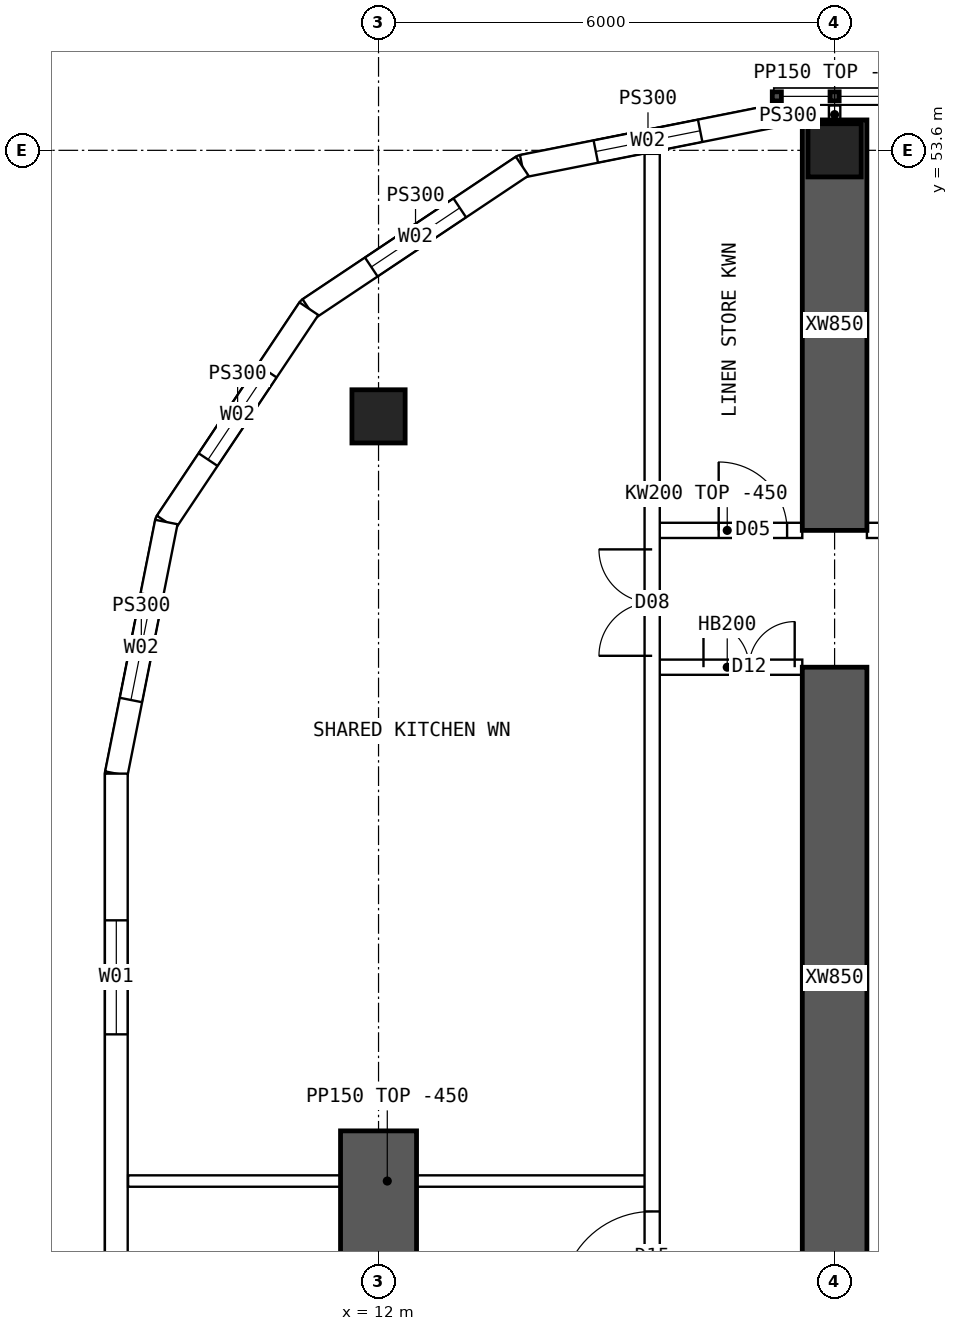
"""IFC4 building model, lengths in metres.
Left out: names, types, materials, properties, quantities, classifications, styles, units other than length and angle.
Written with IfcOpenShell. Run it as: python <this file> out.ifc"""

import sys

from ifc_helpers import new_model, si_unit, direction, frame, frame_2d, origin, origin_2d, place, context, subcontext, project, spatial, polyline, rectangle, hollow_rectangle, outline, extrude, element, fill, save


model = new_model("IFC4")
c1 = context("Model", 3, precision=1e-05, world=origin(), true_north=direction((0.0, 1.0)))
c2 = subcontext(c1, "Body", "Model", "MODEL_VIEW")
j1 = project(units=[si_unit("LENGTHUNIT", "METRE"), si_unit("PLANEANGLEUNIT", "RADIAN")], contexts=[c1])
p1 = place(None, origin())
s1 = spatial("IfcSite", under=j1, at=p1, CompositionType="ELEMENT")
p2 = place(p1, origin())
s2 = spatial("IfcBuilding", under=s1, at=p2, CompositionType="ELEMENT")
p3 = place(p2, frame((0.0, 0.0, 159.85)))
s3 = spatial("IfcBuildingStorey", under=s2, at=p3, CompositionType="ELEMENT", Elevation=159.85)
for number, where, z_axis, x_axis in (
    (1, (18.0, 53.6, 0.0), (0.0, 0.0, 1.0), (1.0, 0.0, 0.0)),
    (2, (12.0, 50.1, 0.0), (0.0, 0.0, 1.0), (1.0, 0.0, 0.0)),
):
    element("IfcColumn", number, at=place(p3, frame(where, z_axis=z_axis, x_axis=x_axis)), inside=s3, PredefinedType="COLUMN", context=c2, shape_type="SweptSolid", body=[
        extrude(hollow_rectangle(XDim=0.7, YDim=0.7, WallThickness=0.07, at=origin_2d()), origin(), (0.0, 0.0, 1.0), 3.75),
    ])
p4 = place(p3, frame((12.0, 35.7, 0.0), z_axis=(0.0, 0.0, 1.0), x_axis=(0.0, 1.0, 0.0)))
e3 = element("IfcWall", 3, at=p4, inside=s3, PredefinedType="SHEAR", context=c2, shape_type="SweptSolid", body=[
    extrude(rectangle(XDim=5.0, YDim=1.0, at=frame_2d((2.5, 0.0))), origin(), (0.0, 0.0, 1.0), 3.75),
])
p5 = place(p3, frame((18.0, 48.6, 0.0), z_axis=(0.0, 0.0, 1.0), x_axis=(0.0, 1.0, 0.0)))
e4 = element("IfcWall", 4, at=p5, inside=s3, PredefinedType="SHEAR", context=c2, shape_type="SweptSolid", body=[
    extrude(rectangle(XDim=5.4, YDim=0.85, at=frame_2d((2.7, 0.0))), origin(), (0.0, 0.0, 1.0), 3.75),
])
p6 = place(p3, frame((18.0, 38.625, 0.0), z_axis=(0.0, 0.0, 1.0), x_axis=(0.0, 1.0, 0.0)))
e5 = element("IfcWall", 5, at=p6, inside=s3, PredefinedType="SHEAR", context=c2, shape_type="SweptSolid", body=[
    extrude(rectangle(XDim=8.175, YDim=0.85, at=frame_2d((4.087, 0.0))), origin(), (0.0, 0.0, 1.0), 3.75),
])
p7 = place(p3, frame((8.55, 45.4, 0.0), z_axis=(0.0, 0.0, 1.0), x_axis=(0.0, -1.0, 0.0)))
e6 = element("IfcWall", 6, at=p7, inside=s3, PredefinedType="SOLIDWALL", context=c2, shape_type="SweptSolid", body=[
    extrude(outline(polyline([(-0.015, -0.15), (26.815, -0.15), (26.785, 0.15), (0.015, 0.15), (-0.015, -0.15)])), origin(), (0.0, 0.0, 1.0), 3.3),
])
p8 = place(p7, frame((1.93, 0.0, 0.9)))
e7 = element("IfcOpeningElement", 7, at=p8, cuts=e6, PredefinedType="OPENING", context=c2, shape_type="SweptSolid", body=[
    extrude(rectangle(XDim=1.5, YDim=2.0, at=frame_2d((0.75, 1.0))), frame((0.0, 0.16, 0.0), z_axis=(0.0, -1.0, 0.0), x_axis=(1.0, 0.0, 0.0)), (0.0, 0.0, 1.0), 0.32),
])
p9 = place(p7, frame((7.29, 0.0, 0.9)))
e8 = element("IfcOpeningElement", 8, at=p9, cuts=e6, PredefinedType="OPENING", context=c2, shape_type="SweptSolid", body=[
    extrude(rectangle(XDim=1.5, YDim=2.0, at=frame_2d((0.75, 1.0))), frame((0.0, 0.16, 0.0), z_axis=(0.0, -1.0, 0.0), x_axis=(1.0, 0.0, 0.0)), (0.0, 0.0, 1.0), 0.32),
])
p10 = place(p7, frame((12.65, 0.0, 0.9)))
e9 = element("IfcOpeningElement", 9, at=p10, cuts=e6, PredefinedType="OPENING", context=c2, shape_type="SweptSolid", body=[
    extrude(rectangle(XDim=1.5, YDim=2.0, at=frame_2d((0.75, 1.0))), frame((0.0, 0.16, 0.0), z_axis=(0.0, -1.0, 0.0), x_axis=(1.0, 0.0, 0.0)), (0.0, 0.0, 1.0), 0.32),
])
p11 = place(p7, frame((18.01, 0.0, 0.9)))
e10 = element("IfcOpeningElement", 10, at=p11, cuts=e6, PredefinedType="OPENING", context=c2, shape_type="SweptSolid", body=[
    extrude(rectangle(XDim=1.5, YDim=2.0, at=frame_2d((0.75, 1.0))), frame((0.0, 0.16, 0.0), z_axis=(0.0, -1.0, 0.0), x_axis=(1.0, 0.0, 0.0)), (0.0, 0.0, 1.0), 0.32),
])
p12 = place(p7, frame((23.37, 0.0, 0.9)))
e11 = element("IfcOpeningElement", 11, at=p12, cuts=e6, PredefinedType="OPENING", context=c2, shape_type="SweptSolid", body=[
    extrude(rectangle(XDim=1.5, YDim=2.0, at=frame_2d((0.75, 1.0))), frame((0.0, 0.16, 0.0), z_axis=(0.0, -1.0, 0.0), x_axis=(1.0, 0.0, 0.0)), (0.0, 0.0, 1.0), 0.32),
])
p13 = place(p3, frame((17.2, 54.05, 0.0), z_axis=(0.0, 0.0, 1.0), x_axis=(-0.98078325777, -0.195100490205, 0.0)))
e12 = element("IfcWall", 12, at=p13, inside=s3, PredefinedType="SOLIDWALL", context=c2, shape_type="SweptSolid", body=[
    extrude(outline(polyline([(-0.03, -0.15), (3.405, -0.15), (3.345, 0.15), (0.03, 0.15), (-0.03, -0.15)])), origin(), (0.0, 0.0, 1.0), 3.3),
])
p14 = place(p13, frame((0.988, 0.0, 0.9)))
e13 = element("IfcOpeningElement", 13, at=p14, cuts=e12, PredefinedType="OPENING", context=c2, shape_type="SweptSolid", body=[
    extrude(rectangle(XDim=1.4, YDim=1.8, at=frame_2d((0.7, 0.9))), frame((0.0, 0.16, 0.0), z_axis=(0.0, -1.0, 0.0), x_axis=(1.0, 0.0, 0.0)), (0.0, 0.0, 1.0), 0.32),
])
p15 = place(p3, frame((13.89, 53.392, 0.0), z_axis=(0.0, 0.0, 1.0), x_axis=(-0.831493450887, -0.555534554399, 0.0)))
e14 = element("IfcWall", 14, at=p15, inside=s3, PredefinedType="SOLIDWALL", context=c2, shape_type="SweptSolid", body=[
    extrude(outline(polyline([(-0.03, -0.15), (3.405, -0.15), (3.345, 0.15), (0.03, 0.15), (-0.03, -0.15)])), origin(), (0.0, 0.0, 1.0), 3.3),
])
p16 = place(p15, frame((0.988, 0.0, 0.9)))
e15 = element("IfcOpeningElement", 15, at=p16, cuts=e14, PredefinedType="OPENING", context=c2, shape_type="SweptSolid", body=[
    extrude(rectangle(XDim=1.4, YDim=1.8, at=frame_2d((0.7, 0.9))), frame((0.0, 0.16, 0.0), z_axis=(0.0, -1.0, 0.0), x_axis=(1.0, 0.0, 0.0)), (0.0, 0.0, 1.0), 0.32),
])
p17 = place(p3, frame((11.083, 51.517, 0.0), z_axis=(0.0, 0.0, 1.0), x_axis=(-0.555534554399, -0.831493450887, 0.0)))
e16 = element("IfcWall", 16, at=p17, inside=s3, PredefinedType="SOLIDWALL", context=c2, shape_type="SweptSolid", body=[
    extrude(outline(polyline([(-0.03, -0.15), (3.405, -0.15), (3.345, 0.15), (0.03, 0.15), (-0.03, -0.15)])), origin(), (0.0, 0.0, 1.0), 3.3),
])
p18 = place(p17, frame((0.988, 0.0, 0.9)))
e17 = element("IfcOpeningElement", 17, at=p18, cuts=e16, PredefinedType="OPENING", context=c2, shape_type="SweptSolid", body=[
    extrude(rectangle(XDim=1.4, YDim=1.8, at=frame_2d((0.7, 0.9))), frame((0.0, 0.16, 0.0), z_axis=(0.0, -1.0, 0.0), x_axis=(1.0, 0.0, 0.0)), (0.0, 0.0, 1.0), 0.32),
])
p19 = place(p3, frame((9.208, 48.71, 0.0), z_axis=(0.0, 0.0, 1.0), x_axis=(-0.19508664885, -0.980786011034, 0.0)))
e18 = element("IfcWall", 18, at=p19, inside=s3, PredefinedType="SOLIDWALL", context=c2, shape_type="SweptSolid", body=[
    extrude(outline(polyline([(-0.03, -0.15), (3.39, -0.15), (3.36, 0.15), (0.03, 0.15), (-0.03, -0.15)])), origin(), (0.0, 0.0, 1.0), 3.3),
])
p20 = place(p19, frame((0.988, 0.0, 0.9)))
e19 = element("IfcOpeningElement", 19, at=p20, cuts=e18, PredefinedType="OPENING", context=c2, shape_type="SweptSolid", body=[
    extrude(rectangle(XDim=1.4, YDim=1.8, at=frame_2d((0.7, 0.9))), frame((0.0, 0.16, 0.0), z_axis=(0.0, -1.0, 0.0), x_axis=(1.0, 0.0, 0.0)), (0.0, 0.0, 1.0), 0.32),
])
p21 = place(p3, frame((17.2, 54.05, 0.0), z_axis=(0.0, 0.0, 1.0), x_axis=(1.0, 0.0, 0.0)))
e20 = element("IfcWall", 20, at=p21, inside=s3, PredefinedType="SOLIDWALL", context=c2, shape_type="SweptSolid", body=[
    extrude(rectangle(XDim=0.375, YDim=0.3, at=frame_2d((0.188, 0.0))), origin(), (0.0, 0.0, 1.0), 3.3),
])
p22 = place(p3, frame((15.6, 48.6, 0.0), z_axis=(0.0, 0.0, 1.0), x_axis=(1.0, 0.0, 0.0)))
e21 = element("IfcWall", 21, at=p22, inside=s3, PredefinedType="SOLIDWALL", context=c2, shape_type="SweptSolid", body=[
    extrude(rectangle(XDim=1.975, YDim=0.2, at=frame_2d((0.987, 0.0))), origin(), (0.0, 0.0, 1.0), 3.3),
])
p23 = place(p22, frame((0.875, 0.0, 0.0)))
e22 = element("IfcOpeningElement", 22, at=p23, cuts=e21, PredefinedType="OPENING", context=c2, shape_type="SweptSolid", body=[
    extrude(rectangle(XDim=0.9, YDim=2.1, at=frame_2d((0.45, 1.05))), frame((0.0, 0.11, 0.0), z_axis=(0.0, -1.0, 0.0), x_axis=(1.0, 0.0, 0.0)), (0.0, 0.0, 1.0), 0.22),
])
p24 = place(p3, frame((15.6, 46.8, 0.0), z_axis=(0.0, 0.0, 1.0), x_axis=(1.0, 0.0, 0.0)))
e23 = element("IfcWall", 23, at=p24, inside=s3, PredefinedType="SOLIDWALL", context=c2, shape_type="SweptSolid", body=[
    extrude(rectangle(XDim=1.975, YDim=0.2, at=frame_2d((0.987, 0.0))), origin(), (0.0, 0.0, 1.0), 3.3),
])
p25 = place(p24, frame((0.675, 0.0, 0.0)))
e24 = element("IfcOpeningElement", 24, at=p25, cuts=e23, PredefinedType="OPENING", context=c2, shape_type="SweptSolid", body=[
    extrude(rectangle(XDim=1.2, YDim=2.1, at=frame_2d((0.6, 1.05))), frame((0.0, 0.11, 0.0), z_axis=(0.0, -1.0, 0.0), x_axis=(1.0, 0.0, 0.0)), (0.0, 0.0, 1.0), 0.22),
])
p26 = place(p3, frame((18.425, 48.6, 0.0), z_axis=(0.0, 0.0, 1.0), x_axis=(1.0, 0.0, 0.0)))
e25 = element("IfcWall", 25, at=p26, inside=s3, PredefinedType="SOLIDWALL", context=c2, shape_type="SweptSolid", body=[
    extrude(outline(polyline([(0.0, 0.0), (5.15, 0.0), (5.15, 2.9), (0.0, 2.9), (0.0, 0.0)])), frame((0.0, 0.1, 0.0), z_axis=(0.0, -1.0, 0.0), x_axis=(1.0, 0.0, 0.0)), (0.0, 0.0, 1.0), 0.2),
])
p27 = place(p26, frame((0.6, 0.0, 0.0)))
e26 = element("IfcOpeningElement", 26, at=p27, cuts=e25, PredefinedType="OPENING", context=c2, shape_type="SweptSolid", body=[
    extrude(rectangle(XDim=1.0, YDim=2.1, at=frame_2d((0.5, 1.05))), frame((0.0, 0.11, 0.0), z_axis=(0.0, -1.0, 0.0), x_axis=(1.0, 0.0, 0.0)), (0.0, 0.0, 1.0), 0.22),
])
p28 = place(p3, frame((15.6, 10.446, 0.0), z_axis=(0.0, 0.0, 1.0), x_axis=(0.0, 1.0, 0.0)))
e27 = element("IfcWall", 27, at=p28, inside=s3, PredefinedType="SOLIDWALL", context=c2, shape_type="SweptSolid", body=[
    extrude(rectangle(XDim=43.107, YDim=0.2, at=frame_2d((21.554, 0.0))), origin(), (0.0, 0.0, 1.0), 3.3),
])
p29 = place(p28, frame((13.914, 0.0, 0.0)))
e28 = element("IfcOpeningElement", 28, at=p29, cuts=e27, PredefinedType="OPENING", context=c2, shape_type="SweptSolid", body=[
    extrude(rectangle(XDim=1.2, YDim=2.1, at=frame_2d((0.6, 1.05))), frame((0.0, 0.11, 0.0), z_axis=(0.0, -1.0, 0.0), x_axis=(1.0, 0.0, 0.0)), (0.0, 0.0, 1.0), 0.22),
])
p30 = place(p28, frame((27.994, 0.0, 0.0)))
e29 = element("IfcOpeningElement", 29, at=p30, cuts=e27, PredefinedType="OPENING", context=c2, shape_type="SweptSolid", body=[
    extrude(rectangle(XDim=1.2, YDim=2.1, at=frame_2d((0.6, 1.05))), frame((0.0, 0.11, 0.0), z_axis=(0.0, -1.0, 0.0), x_axis=(1.0, 0.0, 0.0)), (0.0, 0.0, 1.0), 0.22),
])
p31 = place(p28, frame((5.104, 0.0, 0.0)))
e30 = element("IfcOpeningElement", 30, at=p31, cuts=e27, PredefinedType="OPENING", context=c2, shape_type="SweptSolid", body=[
    extrude(rectangle(XDim=1.4, YDim=2.1, at=frame_2d((0.7, 1.05))), frame((0.0, 0.11, 0.0), z_axis=(0.0, -1.0, 0.0), x_axis=(1.0, 0.0, 0.0)), (0.0, 0.0, 1.0), 0.22),
])
p32 = place(p28, frame((36.504, 0.0, 0.0)))
e31 = element("IfcOpeningElement", 31, at=p32, cuts=e27, PredefinedType="OPENING", context=c2, shape_type="SweptSolid", body=[
    extrude(rectangle(XDim=1.4, YDim=2.1, at=frame_2d((0.7, 1.05))), frame((0.0, 0.11, 0.0), z_axis=(0.0, -1.0, 0.0), x_axis=(1.0, 0.0, 0.0)), (0.0, 0.0, 1.0), 0.22),
])
p33 = place(p3, frame((8.705, 40.04, 0.0), z_axis=(0.0, 0.0, 1.0), x_axis=(1.0, 0.0, 0.0)))
e32 = element("IfcWall", 32, at=p33, inside=s3, PredefinedType="PARTITIONING", context=c2, shape_type="SweptSolid", body=[
    extrude(rectangle(XDim=6.82, YDim=0.15, at=frame_2d((3.41, 0.0))), origin(), (0.0, 0.0, 1.0), 3.3),
])
p34 = place(p3, frame((18.0, 53.95, 0.0), z_axis=(0.0, 0.0, 1.0), x_axis=(0.0, 1.0, 0.0)))
e33 = element("IfcWall", 33, at=p34, inside=s3, PredefinedType="PARTITIONING", context=c2, shape_type="SweptSolid", body=[
    extrude(rectangle(XDim=0.24, YDim=0.15, at=frame_2d((0.12, 0.0))), origin(), (0.0, 0.0, 1.0), 3.3),
])
p35 = place(p8, origin())
e34 = element("IfcWindow", 34, at=p35, inside=s3, PartitioningType="SINGLE_PANEL", PredefinedType="WINDOW", context=c2, shape_type="SweptSolid", body=[
    extrude(rectangle(XDim=1.5, YDim=2.0, at=frame_2d((0.75, 1.0))), frame((0.0, 0.03, 0.0), z_axis=(0.0, -1.0, 0.0), x_axis=(1.0, 0.0, 0.0)), (0.0, 0.0, 1.0), 0.06),
])
fill(e7, e34)
p36 = place(p14, origin())
e35 = element("IfcWindow", 35, at=p36, inside=s3, PartitioningType="SINGLE_PANEL", PredefinedType="WINDOW", context=c2, shape_type="SweptSolid", body=[
    extrude(rectangle(XDim=1.4, YDim=1.8, at=frame_2d((0.7, 0.9))), frame((0.0, 0.03, 0.0), z_axis=(0.0, -1.0, 0.0), x_axis=(1.0, 0.0, 0.0)), (0.0, 0.0, 1.0), 0.06),
])
fill(e13, e35)
p37 = place(p16, origin())
e36 = element("IfcWindow", 36, at=p37, inside=s3, PartitioningType="SINGLE_PANEL", PredefinedType="WINDOW", context=c2, shape_type="SweptSolid", body=[
    extrude(rectangle(XDim=1.4, YDim=1.8, at=frame_2d((0.7, 0.9))), frame((0.0, 0.03, 0.0), z_axis=(0.0, -1.0, 0.0), x_axis=(1.0, 0.0, 0.0)), (0.0, 0.0, 1.0), 0.06),
])
fill(e15, e36)
p38 = place(p18, origin())
e37 = element("IfcWindow", 37, at=p38, inside=s3, PartitioningType="SINGLE_PANEL", PredefinedType="WINDOW", context=c2, shape_type="SweptSolid", body=[
    extrude(rectangle(XDim=1.4, YDim=1.8, at=frame_2d((0.7, 0.9))), frame((0.0, 0.03, 0.0), z_axis=(0.0, -1.0, 0.0), x_axis=(1.0, 0.0, 0.0)), (0.0, 0.0, 1.0), 0.06),
])
fill(e17, e37)
p39 = place(p20, origin())
e38 = element("IfcWindow", 38, at=p39, inside=s3, PartitioningType="SINGLE_PANEL", PredefinedType="WINDOW", context=c2, shape_type="SweptSolid", body=[
    extrude(rectangle(XDim=1.4, YDim=1.8, at=frame_2d((0.7, 0.9))), frame((0.0, 0.03, 0.0), z_axis=(0.0, -1.0, 0.0), x_axis=(1.0, 0.0, 0.0)), (0.0, 0.0, 1.0), 0.06),
])
fill(e19, e38)
p40 = place(p25, origin())
e39 = element("IfcDoor", 39, at=p40, inside=s3, OperationType="DOUBLE_DOOR_SINGLE_SWING", PredefinedType="DOOR", context=c2, shape_type="SweptSolid", body=[
    extrude(rectangle(XDim=1.2, YDim=2.1, at=frame_2d((0.6, 1.05))), frame((0.0, 0.025, 0.0), z_axis=(0.0, -1.0, 0.0), x_axis=(1.0, 0.0, 0.0)), (0.0, 0.0, 1.0), 0.05),
])
fill(e24, e39)
p41 = place(p30, origin())
e40 = element("IfcDoor", 40, at=p41, inside=s3, OperationType="SINGLE_SWING_LEFT", PredefinedType="DOOR", context=c2, shape_type="SweptSolid", body=[
    extrude(rectangle(XDim=1.2, YDim=2.1, at=frame_2d((0.6, 1.05))), frame((0.0, 0.025, 0.0), z_axis=(0.0, -1.0, 0.0), x_axis=(1.0, 0.0, 0.0)), (0.0, 0.0, 1.0), 0.05),
])
fill(e29, e40)
p42 = place(p32, origin())
e41 = element("IfcDoor", 41, at=p42, inside=s3, OperationType="DOUBLE_DOOR_SINGLE_SWING", PredefinedType="DOOR", context=c2, shape_type="SweptSolid", body=[
    extrude(rectangle(XDim=1.4, YDim=2.1, at=frame_2d((0.7, 1.05))), frame((0.0, 0.025, 0.0), z_axis=(0.0, -1.0, 0.0), x_axis=(1.0, 0.0, 0.0)), (0.0, 0.0, 1.0), 0.05),
])
fill(e31, e41)
p43 = place(p23, origin())
e42 = element("IfcDoor", 42, at=p43, inside=s3, OperationType="SINGLE_SWING_LEFT", PredefinedType="DOOR", context=c2, shape_type="SweptSolid", body=[
    extrude(rectangle(XDim=0.9, YDim=2.1, at=frame_2d((0.45, 1.05))), frame((0.0, 0.025, 0.0), z_axis=(0.0, -1.0, 0.0), x_axis=(1.0, 0.0, 0.0)), (0.0, 0.0, 1.0), 0.05),
])
fill(e22, e42)
save(model, sys.argv[1])
